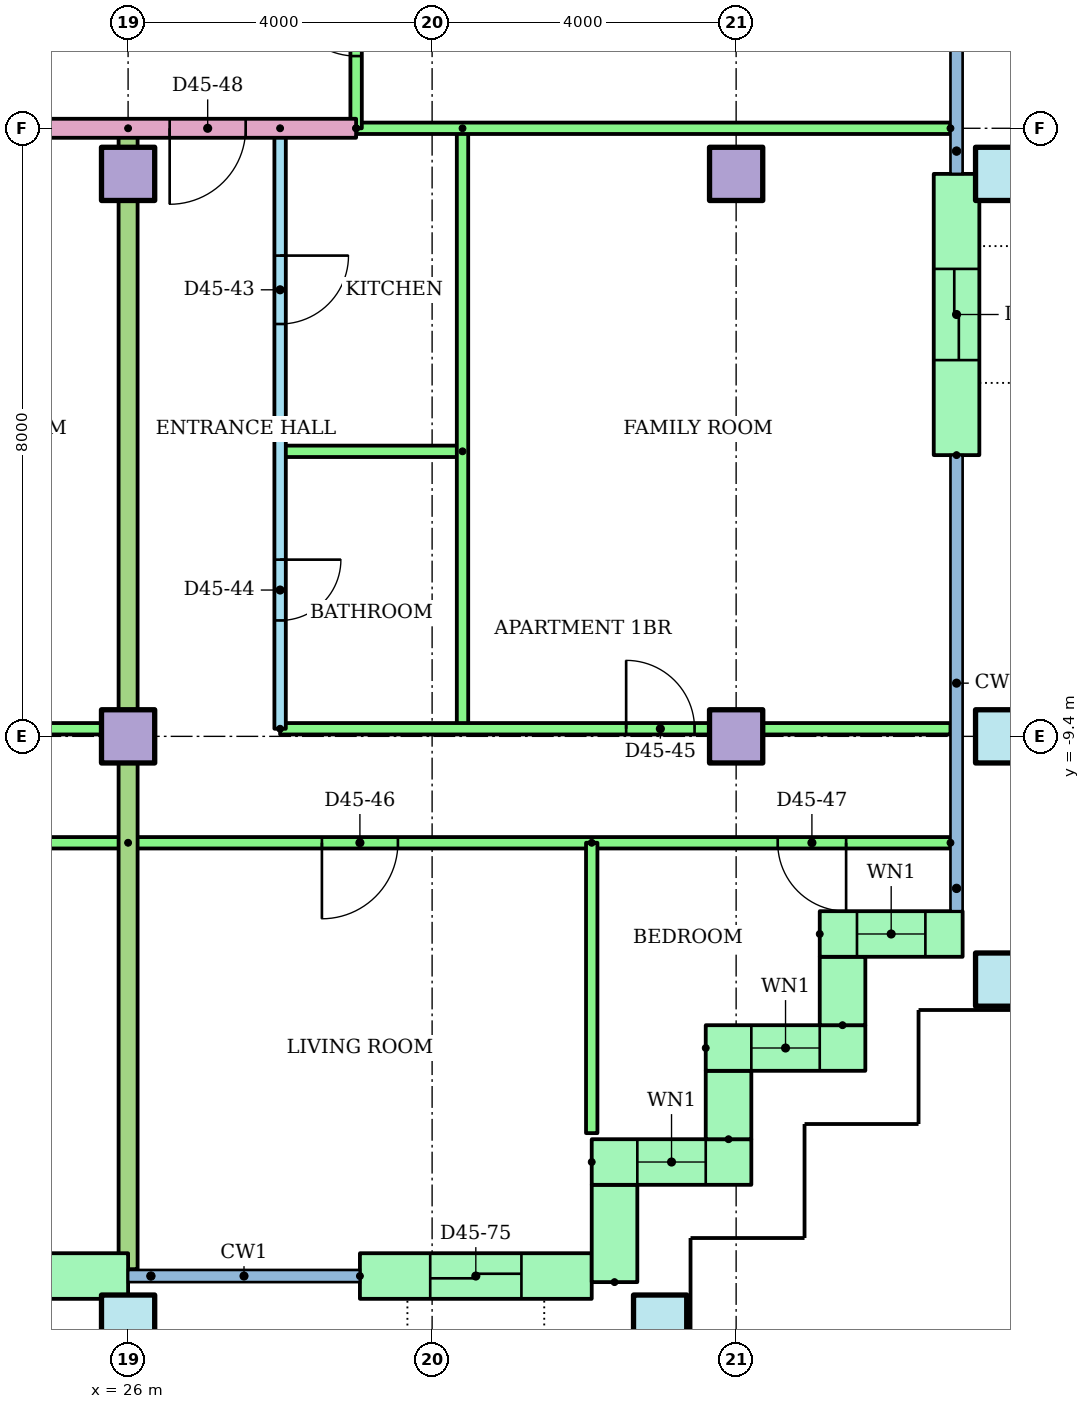
"""IFC4 building model, lengths in metres.
Left out: names, types, materials, properties, quantities, classifications, styles, units other than length and angle.
Written with IfcOpenShell. Run it as: python <this file> out.ifc"""

import sys

from ifc_helpers import new_model, si_unit, direction, frame, frame_2d, origin, origin_2d, place, context, subcontext, project, spatial, rectangle, hollow_rectangle, extrude, element, fill, save


model = new_model("IFC4")
c1 = context("Model", 3, precision=1e-05, world=origin(), true_north=direction((0.0, 1.0)))
c2 = subcontext(c1, "Body", "Model", "MODEL_VIEW")
j1 = project(units=[si_unit("LENGTHUNIT", "METRE"), si_unit("PLANEANGLEUNIT", "RADIAN")], contexts=[c1])
p1 = place(None, origin())
s1 = spatial("IfcSite", under=j1, at=p1, CompositionType="ELEMENT")
p2 = place(p1, origin())
s2 = spatial("IfcBuilding", under=s1, at=p2, CompositionType="ELEMENT")
p3 = place(p2, frame((0.0, 0.0, 174.9)))
s3 = spatial("IfcBuildingStorey", under=s2, at=p3, CompositionType="ELEMENT", Elevation=174.9)
for number, where in (
    (1, (26.0, -17.1, 0.0)),
    (2, (33.0, -17.1, 0.0)),
    (3, (37.5, -12.6, 0.0)),
):
    element("IfcColumn", number, at=place(p3, frame(where)), inside=s3, PredefinedType="COLUMN", context=c2, shape_type="SweptSolid", body=[
        extrude(hollow_rectangle(XDim=0.7, YDim=0.7, WallThickness=0.036, at=origin_2d()), origin(), (0.0, 0.0, 1.0), 3.2),
    ])
for number, where in (
    (4, (26.0, -9.4, 0.0)),
    (5, (34.0, -9.4, 0.0)),
):
    element("IfcColumn", number, at=place(p3, frame(where)), inside=s3, PredefinedType="COLUMN", context=c2, shape_type="SweptSolid", body=[
        extrude(rectangle(XDim=0.7, YDim=0.7, at=origin_2d()), origin(), (0.0, 0.0, 1.0), 3.2),
    ])
p4 = place(p3, frame((37.5, -9.4, 0.0)))
e6 = element("IfcColumn", 6, at=p4, inside=s3, PredefinedType="COLUMN", context=c2, shape_type="SweptSolid", body=[
    extrude(hollow_rectangle(XDim=0.7, YDim=0.7, WallThickness=0.036, at=origin_2d()), origin(), (0.0, 0.0, 1.0), 3.2),
])
for number, where in (
    (7, (26.0, -2.0, 0.0)),
    (8, (34.0, -2.0, 0.0)),
):
    element("IfcColumn", number, at=place(p3, frame(where)), inside=s3, PredefinedType="COLUMN", context=c2, shape_type="SweptSolid", body=[
        extrude(rectangle(XDim=0.7, YDim=0.7, at=origin_2d()), origin(), (0.0, 0.0, 1.0), 3.2),
    ])
p5 = place(p3, frame((37.5, -2.0, 0.0)))
e9 = element("IfcColumn", 9, at=p5, inside=s3, PredefinedType="COLUMN", context=c2, shape_type="SweptSolid", body=[
    extrude(hollow_rectangle(XDim=0.7, YDim=0.7, WallThickness=0.036, at=origin_2d()), origin(), (0.0, 0.0, 1.0), 3.2),
])
p6 = place(p3, frame((22.0, -16.5, 0.0)))
e10 = element("IfcWall", 10, at=p6, inside=s3, PredefinedType="STANDARD", context=c2, shape_type="SweptSolid", body=[
    extrude(rectangle(XDim=4.0, YDim=0.6, at=frame_2d((2.0, 0.0))), origin(), (0.0, 0.0, 1.0), 2.92),
])
p7 = place(p6, frame((1.4, 0.0, 0.0)))
e11 = element("IfcOpeningElement", 11, at=p7, cuts=e10, PredefinedType="OPENING", context=c2, shape_type="SweptSolid", body=[
    extrude(rectangle(XDim=1.2, YDim=2.1, at=frame_2d((0.6, 1.05))), frame((0.0, 0.31, 0.0), z_axis=(0.0, -1.0, 0.0), x_axis=(1.0, 0.0, 0.0)), (0.0, 0.0, 1.0), 0.62),
])
p8 = place(p3, frame((29.05, -16.5, 0.0)))
e12 = element("IfcWall", 12, at=p8, inside=s3, PredefinedType="STANDARD", context=c2, shape_type="SweptSolid", body=[
    extrude(rectangle(XDim=3.05, YDim=0.6, at=frame_2d((1.525, 0.0))), origin(), (0.0, 0.0, 1.0), 2.92),
])
p9 = place(p8, frame((0.925, 0.0, 0.0)))
e13 = element("IfcOpeningElement", 13, at=p9, cuts=e12, PredefinedType="OPENING", context=c2, shape_type="SweptSolid", body=[
    extrude(rectangle(XDim=1.2, YDim=2.1, at=frame_2d((0.6, 1.05))), frame((0.0, 0.31, 0.0), z_axis=(0.0, -1.0, 0.0), x_axis=(1.0, 0.0, 0.0)), (0.0, 0.0, 1.0), 0.62),
])
p10 = place(p3, frame((32.4, -16.58, 0.0), z_axis=(0.0, 0.0, 1.0), x_axis=(0.0, 1.0, 0.0)))
e14 = element("IfcWall", 14, at=p10, inside=s3, PredefinedType="STANDARD", context=c2, shape_type="SweptSolid", body=[
    extrude(rectangle(XDim=1.28, YDim=0.6, at=frame_2d((0.64, 0.0))), origin(), (0.0, 0.0, 1.0), 2.92),
])
p11 = place(p3, frame((32.1, -15.0, 0.0)))
e15 = element("IfcWall", 15, at=p11, inside=s3, PredefinedType="STANDARD", context=c2, shape_type="SweptSolid", body=[
    extrude(rectangle(XDim=2.1, YDim=0.6, at=frame_2d((1.05, 0.0))), origin(), (0.0, 0.0, 1.0), 2.92),
])
p12 = place(p11, frame((0.6, 0.0, 0.9)))
e16 = element("IfcOpeningElement", 16, at=p12, cuts=e15, PredefinedType="OPENING", context=c2, shape_type="SweptSolid", body=[
    extrude(rectangle(XDim=0.9, YDim=1.5, at=frame_2d((0.45, 0.75))), frame((0.0, 0.31, 0.0), z_axis=(0.0, -1.0, 0.0), x_axis=(1.0, 0.0, 0.0)), (0.0, 0.0, 1.0), 0.62),
])
p13 = place(p3, frame((33.9, -14.7, 0.0), z_axis=(0.0, 0.0, 1.0), x_axis=(0.0, 1.0, 0.0)))
e17 = element("IfcWall", 17, at=p13, inside=s3, PredefinedType="STANDARD", context=c2, shape_type="SweptSolid", body=[
    extrude(rectangle(XDim=0.9, YDim=0.6, at=frame_2d((0.45, 0.0))), origin(), (0.0, 0.0, 1.0), 2.92),
])
p14 = place(p3, frame((33.6, -13.5, 0.0)))
e18 = element("IfcWall", 18, at=p14, inside=s3, PredefinedType="STANDARD", context=c2, shape_type="SweptSolid", body=[
    extrude(rectangle(XDim=2.1, YDim=0.6, at=frame_2d((1.05, 0.0))), origin(), (0.0, 0.0, 1.0), 2.92),
])
p15 = place(p14, frame((0.6, 0.0, 0.9)))
e19 = element("IfcOpeningElement", 19, at=p15, cuts=e18, PredefinedType="OPENING", context=c2, shape_type="SweptSolid", body=[
    extrude(rectangle(XDim=0.9, YDim=1.5, at=frame_2d((0.45, 0.75))), frame((0.0, 0.31, 0.0), z_axis=(0.0, -1.0, 0.0), x_axis=(1.0, 0.0, 0.0)), (0.0, 0.0, 1.0), 0.62),
])
p16 = place(p3, frame((35.4, -13.2, 0.0), z_axis=(0.0, 0.0, 1.0), x_axis=(0.0, 1.0, 0.0)))
e20 = element("IfcWall", 20, at=p16, inside=s3, PredefinedType="STANDARD", context=c2, shape_type="SweptSolid", body=[
    extrude(rectangle(XDim=0.9, YDim=0.6, at=frame_2d((0.45, 0.0))), origin(), (0.0, 0.0, 1.0), 2.92),
])
p17 = place(p3, frame((35.1, -12.0, 0.0)))
e21 = element("IfcWall", 21, at=p17, inside=s3, PredefinedType="STANDARD", context=c2, shape_type="SweptSolid", body=[
    extrude(rectangle(XDim=1.88, YDim=0.6, at=frame_2d((0.94, 0.0))), origin(), (0.0, 0.0, 1.0), 2.92),
])
p18 = place(p17, frame((0.49, 0.0, 0.9)))
e22 = element("IfcOpeningElement", 22, at=p18, cuts=e21, PredefinedType="OPENING", context=c2, shape_type="SweptSolid", body=[
    extrude(rectangle(XDim=0.9, YDim=1.5, at=frame_2d((0.45, 0.75))), frame((0.0, 0.31, 0.0), z_axis=(0.0, -1.0, 0.0), x_axis=(1.0, 0.0, 0.0)), (0.0, 0.0, 1.0), 0.62),
])
p19 = place(p3, frame((36.9, -5.7, 0.0), z_axis=(0.0, 0.0, 1.0), x_axis=(0.0, 1.0, 0.0)))
e23 = element("IfcWall", 23, at=p19, inside=s3, PredefinedType="STANDARD", context=c2, shape_type="SweptSolid", body=[
    extrude(rectangle(XDim=3.7, YDim=0.6, at=frame_2d((1.85, 0.0))), origin(), (0.0, 0.0, 1.0), 2.92),
])
p20 = place(p19, frame((1.25, 0.0, 0.0)))
e24 = element("IfcOpeningElement", 24, at=p20, cuts=e23, PredefinedType="OPENING", context=c2, shape_type="SweptSolid", body=[
    extrude(rectangle(XDim=1.2, YDim=2.1, at=frame_2d((0.6, 1.05))), frame((0.0, 0.31, 0.0), z_axis=(0.0, -1.0, 0.0), x_axis=(1.0, 0.0, 0.0)), (0.0, 0.0, 1.0), 0.62),
])
p21 = place(p3, frame((20.0, -9.3, 0.0)))
e25 = element("IfcWall", 25, at=p21, inside=s3, PredefinedType="PARTITIONING", context=c2, shape_type="SweptSolid", body=[
    extrude(rectangle(XDim=6.0, YDim=0.15, at=frame_2d((3.0, 0.0))), origin(), (0.0, 0.0, 1.0), 2.4),
])
p22 = place(p21, frame((3.75, 0.0, 0.0)))
e26 = element("IfcOpeningElement", 26, at=p22, cuts=e25, PredefinedType="OPENING", context=c2, shape_type="SweptSolid", body=[
    extrude(rectangle(XDim=0.9, YDim=2.1, at=frame_2d((0.45, 1.05))), frame((0.0, 0.085, 0.0), z_axis=(0.0, -1.0, 0.0), x_axis=(1.0, 0.0, 0.0)), (0.0, 0.0, 1.0), 0.17),
])
p23 = place(p3, frame((26.0, -10.8, 0.0), z_axis=(0.0, 0.0, 1.0), x_axis=(-1.0, 0.0, 0.0)))
e27 = element("IfcWall", 27, at=p23, inside=s3, PredefinedType="PARTITIONING", context=c2, shape_type="SweptSolid", body=[
    extrude(rectangle(XDim=8.0, YDim=0.15, at=frame_2d((4.0, 0.0))), origin(), (0.0, 0.0, 1.0), 2.4),
])
p24 = place(p23, frame((5.55, 0.0, 0.0)))
e28 = element("IfcOpeningElement", 28, at=p24, cuts=e27, PredefinedType="OPENING", context=c2, shape_type="SweptSolid", body=[
    extrude(rectangle(XDim=0.9, YDim=2.1, at=frame_2d((0.45, 1.05))), frame((0.0, 0.085, 0.0), z_axis=(0.0, -1.0, 0.0), x_axis=(1.0, 0.0, 0.0)), (0.0, 0.0, 1.0), 0.17),
])
p25 = place(p23, frame((1.5, 0.0, 0.0)))
e29 = element("IfcOpeningElement", 29, at=p25, cuts=e27, PredefinedType="OPENING", context=c2, shape_type="SweptSolid", body=[
    extrude(rectangle(XDim=1.0, YDim=2.1, at=frame_2d((0.5, 1.05))), frame((0.0, 0.085, 0.0), z_axis=(0.0, -1.0, 0.0), x_axis=(1.0, 0.0, 0.0)), (0.0, 0.0, 1.0), 0.17),
])
p26 = place(p3, frame((28.0, -1.4, 0.0), z_axis=(0.0, 0.0, 1.0), x_axis=(0.0, -1.0, 0.0)))
e30 = element("IfcWall", 30, at=p26, inside=s3, PredefinedType="PARTITIONING", context=c2, shape_type="SweptSolid", body=[
    extrude(rectangle(XDim=7.9, YDim=0.15, at=frame_2d((3.95, 0.0))), origin(), (0.0, 0.0, 1.0), 2.4),
])
p27 = place(p26, frame((1.675, 0.0, 0.0)))
e31 = element("IfcOpeningElement", 31, at=p27, cuts=e30, PredefinedType="OPENING", context=c2, shape_type="SweptSolid", body=[
    extrude(rectangle(XDim=0.9, YDim=2.1, at=frame_2d((0.45, 1.05))), frame((0.0, 0.085, 0.0), z_axis=(0.0, -1.0, 0.0), x_axis=(1.0, 0.0, 0.0)), (0.0, 0.0, 1.0), 0.17),
])
p28 = place(p26, frame((5.675, 0.0, 0.0)))
e32 = element("IfcOpeningElement", 32, at=p28, cuts=e30, PredefinedType="OPENING", context=c2, shape_type="SweptSolid", body=[
    extrude(rectangle(XDim=0.8, YDim=2.1, at=frame_2d((0.4, 1.05))), frame((0.0, 0.085, 0.0), z_axis=(0.0, -1.0, 0.0), x_axis=(1.0, 0.0, 0.0)), (0.0, 0.0, 1.0), 0.17),
])
p29 = place(p3, frame((30.4, -5.65, 0.0), z_axis=(0.0, 0.0, 1.0), x_axis=(-1.0, 0.0, 0.0)))
e33 = element("IfcWall", 33, at=p29, inside=s3, PredefinedType="PARTITIONING", context=c2, shape_type="SweptSolid", body=[
    extrude(rectangle(XDim=2.4, YDim=0.15, at=frame_2d((1.2, 0.0))), origin(), (0.0, 0.0, 1.0), 2.4),
])
p30 = place(p3, frame((30.4, -1.4, 0.0), z_axis=(0.0, 0.0, 1.0), x_axis=(0.0, -1.0, 0.0)))
e34 = element("IfcWall", 34, at=p30, inside=s3, PredefinedType="PARTITIONING", context=c2, shape_type="SweptSolid", body=[
    extrude(rectangle(XDim=7.9, YDim=0.15, at=frame_2d((3.95, 0.0))), origin(), (0.0, 0.0, 1.0), 2.4),
])
p31 = place(p3, frame((28.0, -9.3, 0.0)))
e35 = element("IfcWall", 35, at=p31, inside=s3, PredefinedType="PARTITIONING", context=c2, shape_type="SweptSolid", body=[
    extrude(rectangle(XDim=8.82, YDim=0.15, at=frame_2d((4.41, 0.0))), origin(), (0.0, 0.0, 1.0), 2.4),
])
p32 = place(p31, frame((4.553, 0.0, 0.0)))
e36 = element("IfcOpeningElement", 36, at=p32, cuts=e35, PredefinedType="OPENING", context=c2, shape_type="SweptSolid", body=[
    extrude(rectangle(XDim=0.9, YDim=2.1, at=frame_2d((0.45, 1.05))), frame((0.0, 0.085, 0.0), z_axis=(0.0, -1.0, 0.0), x_axis=(1.0, 0.0, 0.0)), (0.0, 0.0, 1.0), 0.17),
])
p33 = place(p3, frame((36.82, -10.8, 0.0), z_axis=(0.0, 0.0, 1.0), x_axis=(-1.0, 0.0, 0.0)))
e37 = element("IfcWall", 37, at=p33, inside=s3, PredefinedType="PARTITIONING", context=c2, shape_type="SweptSolid", body=[
    extrude(rectangle(XDim=10.82, YDim=0.15, at=frame_2d((5.41, 0.0))), origin(), (0.0, 0.0, 1.0), 2.4),
])
p34 = place(p33, frame((7.27, 0.0, 0.0)))
e38 = element("IfcOpeningElement", 38, at=p34, cuts=e37, PredefinedType="OPENING", context=c2, shape_type="SweptSolid", body=[
    extrude(rectangle(XDim=1.0, YDim=2.1, at=frame_2d((0.5, 1.05))), frame((0.0, 0.085, 0.0), z_axis=(0.0, -1.0, 0.0), x_axis=(1.0, 0.0, 0.0)), (0.0, 0.0, 1.0), 0.17),
])
p35 = place(p33, frame((1.373, 0.0, 0.0)))
e39 = element("IfcOpeningElement", 39, at=p35, cuts=e37, PredefinedType="OPENING", context=c2, shape_type="SweptSolid", body=[
    extrude(rectangle(XDim=0.9, YDim=2.1, at=frame_2d((0.45, 1.05))), frame((0.0, 0.085, 0.0), z_axis=(0.0, -1.0, 0.0), x_axis=(1.0, 0.0, 0.0)), (0.0, 0.0, 1.0), 0.17),
])
p36 = place(p3, frame((32.1, -10.8, 0.0), z_axis=(0.0, 0.0, 1.0), x_axis=(0.0, -1.0, 0.0)))
e40 = element("IfcWall", 40, at=p36, inside=s3, PredefinedType="PARTITIONING", context=c2, shape_type="SweptSolid", body=[
    extrude(rectangle(XDim=3.82, YDim=0.15, at=frame_2d((1.91, 0.0))), origin(), (0.0, 0.0, 1.0), 2.4),
])
p37 = place(p3, frame((26.0, -1.4, 0.0), z_axis=(0.0, 0.0, 1.0), x_axis=(0.0, -1.0, 0.0)))
e41 = element("IfcWall", 41, at=p37, inside=s3, PredefinedType="PARTITIONING", context=c2, shape_type="SweptSolid", body=[
    extrude(rectangle(XDim=15.01, YDim=0.25, at=frame_2d((7.505, 0.0))), origin(), (0.0, 0.0, 1.0), 2.4),
])
p38 = place(p3, frame((29.0, -1.4, 0.0), z_axis=(0.0, 0.0, 1.0), x_axis=(-1.0, 0.0, 0.0)))
e42 = element("IfcWall", 42, at=p38, inside=s3, PredefinedType="PARTITIONING", context=c2, shape_type="SweptSolid", body=[
    extrude(rectangle(XDim=15.0, YDim=0.25, at=frame_2d((7.5, 0.0))), origin(), (0.0, 0.0, 1.0), 2.4),
])
p39 = place(p38, frame((9.453, 0.0, 0.0)))
e43 = element("IfcOpeningElement", 43, at=p39, cuts=e42, PredefinedType="OPENING", context=c2, shape_type="SweptSolid", body=[
    extrude(rectangle(XDim=1.0, YDim=2.1, at=frame_2d((0.5, 1.05))), frame((0.0, 0.135, 0.0), z_axis=(0.0, -1.0, 0.0), x_axis=(1.0, 0.0, 0.0)), (0.0, 0.0, 1.0), 0.27),
])
p40 = place(p38, frame((1.453, 0.0, 0.0)))
e44 = element("IfcOpeningElement", 44, at=p40, cuts=e42, PredefinedType="OPENING", context=c2, shape_type="SweptSolid", body=[
    extrude(rectangle(XDim=1.0, YDim=2.1, at=frame_2d((0.5, 1.05))), frame((0.0, 0.135, 0.0), z_axis=(0.0, -1.0, 0.0), x_axis=(1.0, 0.0, 0.0)), (0.0, 0.0, 1.0), 0.27),
])
p41 = place(p3, frame((36.82, -1.4, 0.0), z_axis=(0.0, 0.0, 1.0), x_axis=(-1.0, 0.0, 0.0)))
e45 = element("IfcWall", 45, at=p41, inside=s3, PredefinedType="PARTITIONING", context=c2, shape_type="SweptSolid", body=[
    extrude(rectangle(XDim=7.82, YDim=0.15, at=frame_2d((3.91, 0.0))), origin(), (0.0, 0.0, 1.0), 2.4),
])
p42 = place(p3, frame((29.0, -1.4, 0.0), z_axis=(0.0, 0.0, 1.0), x_axis=(0.0, 1.0, 0.0)))
e46 = element("IfcWall", 46, at=p42, inside=s3, PredefinedType="PARTITIONING", context=c2, shape_type="SweptSolid", body=[
    extrude(rectangle(XDim=2.8, YDim=0.15, at=frame_2d((1.4, 0.0))), origin(), (0.0, 0.0, 1.0), 2.4),
])
p43 = place(p42, frame((0.95, 0.0, 0.0)))
e47 = element("IfcOpeningElement", 47, at=p43, cuts=e46, PredefinedType="OPENING", context=c2, shape_type="SweptSolid", body=[
    extrude(rectangle(XDim=0.9, YDim=2.1, at=frame_2d((0.45, 1.05))), frame((0.0, 0.085, 0.0), z_axis=(0.0, -1.0, 0.0), x_axis=(1.0, 0.0, 0.0)), (0.0, 0.0, 1.0), 0.17),
])
p44 = place(p12, origin())
e48 = element("IfcWindow", 48, at=p44, inside=s3, PartitioningType="SINGLE_PANEL", PredefinedType="WINDOW", context=c2, shape_type="SweptSolid", body=[
    extrude(rectangle(XDim=0.9, YDim=1.5, at=frame_2d((0.45, 0.75))), frame((0.0, 0.03, 0.0), z_axis=(0.0, -1.0, 0.0), x_axis=(1.0, 0.0, 0.0)), (0.0, 0.0, 1.0), 0.06),
])
fill(e16, e48)
p45 = place(p15, origin())
e49 = element("IfcWindow", 49, at=p45, inside=s3, PartitioningType="SINGLE_PANEL", PredefinedType="WINDOW", context=c2, shape_type="SweptSolid", body=[
    extrude(rectangle(XDim=0.9, YDim=1.5, at=frame_2d((0.45, 0.75))), frame((0.0, 0.03, 0.0), z_axis=(0.0, -1.0, 0.0), x_axis=(1.0, 0.0, 0.0)), (0.0, 0.0, 1.0), 0.06),
])
fill(e19, e49)
p46 = place(p18, origin())
e50 = element("IfcWindow", 50, at=p46, inside=s3, PartitioningType="SINGLE_PANEL", PredefinedType="WINDOW", context=c2, shape_type="SweptSolid", body=[
    extrude(rectangle(XDim=0.9, YDim=1.5, at=frame_2d((0.45, 0.75))), frame((0.0, 0.03, 0.0), z_axis=(0.0, -1.0, 0.0), x_axis=(1.0, 0.0, 0.0)), (0.0, 0.0, 1.0), 0.06),
])
fill(e22, e50)
p47 = place(p27, origin())
e51 = element("IfcDoor", 51, at=p47, inside=s3, OperationType="SINGLE_SWING_LEFT", PredefinedType="DOOR", context=c2, shape_type="SweptSolid", body=[
    extrude(rectangle(XDim=0.9, YDim=2.1, at=frame_2d((0.45, 1.05))), frame((0.0, 0.025, 0.0), z_axis=(0.0, -1.0, 0.0), x_axis=(1.0, 0.0, 0.0)), (0.0, 0.0, 1.0), 0.05),
])
fill(e31, e51)
p48 = place(p28, origin())
e52 = element("IfcDoor", 52, at=p48, inside=s3, OperationType="SINGLE_SWING_LEFT", PredefinedType="DOOR", context=c2, shape_type="SweptSolid", body=[
    extrude(rectangle(XDim=0.8, YDim=2.1, at=frame_2d((0.4, 1.05))), frame((0.0, 0.025, 0.0), z_axis=(0.0, -1.0, 0.0), x_axis=(1.0, 0.0, 0.0)), (0.0, 0.0, 1.0), 0.05),
])
fill(e32, e52)
p49 = place(p32, origin())
e53 = element("IfcDoor", 53, at=p49, inside=s3, OperationType="SINGLE_SWING_LEFT", PredefinedType="DOOR", context=c2, shape_type="SweptSolid", body=[
    extrude(rectangle(XDim=0.9, YDim=2.1, at=frame_2d((0.45, 1.05))), frame((0.0, 0.025, 0.0), z_axis=(0.0, -1.0, 0.0), x_axis=(1.0, 0.0, 0.0)), (0.0, 0.0, 1.0), 0.05),
])
fill(e36, e53)
p50 = place(p34, origin())
e54 = element("IfcDoor", 54, at=p50, inside=s3, OperationType="SINGLE_SWING_RIGHT", PredefinedType="DOOR", context=c2, shape_type="SweptSolid", body=[
    extrude(rectangle(XDim=1.0, YDim=2.1, at=frame_2d((0.5, 1.05))), frame((0.0, 0.025, 0.0), z_axis=(0.0, -1.0, 0.0), x_axis=(1.0, 0.0, 0.0)), (0.0, 0.0, 1.0), 0.05),
])
fill(e38, e54)
p51 = place(p35, origin())
e55 = element("IfcDoor", 55, at=p51, inside=s3, OperationType="SINGLE_SWING_LEFT", PredefinedType="DOOR", context=c2, shape_type="SweptSolid", body=[
    extrude(rectangle(XDim=0.9, YDim=2.1, at=frame_2d((0.45, 1.05))), frame((0.0, 0.025, 0.0), z_axis=(0.0, -1.0, 0.0), x_axis=(1.0, 0.0, 0.0)), (0.0, 0.0, 1.0), 0.05),
])
fill(e39, e55)
p52 = place(p40, origin())
e56 = element("IfcDoor", 56, at=p52, inside=s3, OperationType="SINGLE_SWING_RIGHT", PredefinedType="DOOR", context=c2, shape_type="SweptSolid", body=[
    extrude(rectangle(XDim=1.0, YDim=2.1, at=frame_2d((0.5, 1.05))), frame((0.0, 0.025, 0.0), z_axis=(0.0, -1.0, 0.0), x_axis=(1.0, 0.0, 0.0)), (0.0, 0.0, 1.0), 0.05),
])
fill(e44, e56)
p53 = place(p43, origin())
e57 = element("IfcDoor", 57, at=p53, inside=s3, OperationType="SINGLE_SWING_RIGHT", PredefinedType="DOOR", context=c2, shape_type="SweptSolid", body=[
    extrude(rectangle(XDim=0.9, YDim=2.1, at=frame_2d((0.45, 1.05))), frame((0.0, 0.025, 0.0), z_axis=(0.0, -1.0, 0.0), x_axis=(1.0, 0.0, 0.0)), (0.0, 0.0, 1.0), 0.05),
])
fill(e47, e57)
p54 = place(p9, origin())
e58 = element("IfcDoor", 58, at=p54, inside=s3, OperationType="SLIDING_TO_LEFT", PredefinedType="DOOR", context=c2, shape_type="SweptSolid", body=[
    extrude(rectangle(XDim=1.2, YDim=2.1, at=frame_2d((0.6, 1.05))), frame((0.0, 0.025, 0.0), z_axis=(0.0, -1.0, 0.0), x_axis=(1.0, 0.0, 0.0)), (0.0, 0.0, 1.0), 0.05),
])
fill(e13, e58)
p55 = place(p20, origin())
e59 = element("IfcDoor", 59, at=p55, inside=s3, OperationType="SLIDING_TO_LEFT", PredefinedType="DOOR", context=c2, shape_type="SweptSolid", body=[
    extrude(rectangle(XDim=1.2, YDim=2.1, at=frame_2d((0.6, 1.05))), frame((0.0, 0.025, 0.0), z_axis=(0.0, -1.0, 0.0), x_axis=(1.0, 0.0, 0.0)), (0.0, 0.0, 1.0), 0.05),
])
fill(e24, e59)
save(model, sys.argv[1])
